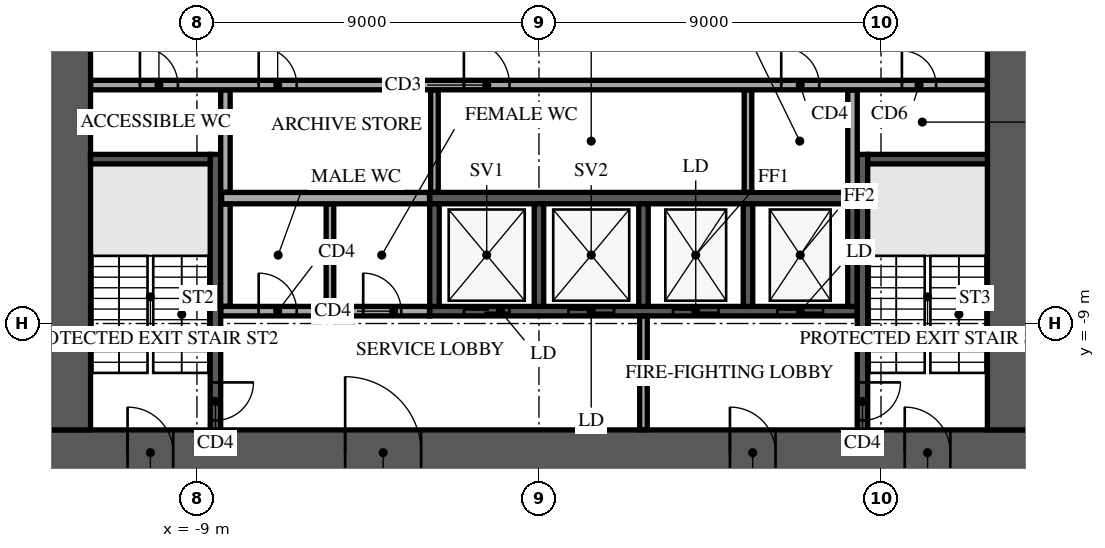
"""IFC4 building model, lengths in metres.
Left out: names, types, materials, properties, quantities, classifications, styles, units other than length and angle.
Written with IfcOpenShell. Run it as: python <this file> out.ifc"""

import sys

from ifc_helpers import new_model, si_unit, direction, frame, frame_2d, origin, place, context, subcontext, project, spatial, rectangle, extrude, element, fill, save


model = new_model("IFC4")
c1 = context("Model", 3, precision=1e-05, world=origin(), true_north=direction((0.0, 1.0)))
c2 = subcontext(c1, "Body", "Model", "MODEL_VIEW")
j1 = project(units=[si_unit("LENGTHUNIT", "METRE"), si_unit("PLANEANGLEUNIT", "RADIAN")], contexts=[c1])
p1 = place(None, origin())
s1 = spatial("IfcSite", under=j1, at=p1, CompositionType="ELEMENT")
p2 = place(p1, origin())
s2 = spatial("IfcBuilding", under=s1, at=p2, CompositionType="ELEMENT")
p3 = place(p2, frame((0.0, 0.0, -9.0)))
s3 = spatial("IfcBuildingStorey", under=s2, at=p3, CompositionType="ELEMENT", Elevation=-9.0)
p4 = place(p3, frame((-13.0, -12.4, 0.0), z_axis=(0.0, 0.0, 1.0), x_axis=(1.0, 0.0, 0.0)))
e1 = element("IfcWall", 1, at=p4, inside=s3, PredefinedType="SHEAR", context=c2, shape_type="SweptSolid", body=[
    extrude(rectangle(XDim=26.0, YDim=1.2, at=frame_2d((13.0, 0.0))), origin(), (0.0, 0.0, 1.0), 4.2),
])
p5 = place(p4, frame((7.9, 0.0, 0.0)))
e2 = element("IfcOpeningElement", 2, at=p5, cuts=e1, PredefinedType="OPENING", context=c2, shape_type="SweptSolid", body=[
    extrude(rectangle(XDim=2.0, YDim=2.1, at=frame_2d((1.0, 1.05))), frame((0.0, 0.61, 0.0), z_axis=(0.0, -1.0, 0.0), x_axis=(1.0, 0.0, 0.0)), (0.0, 0.0, 1.0), 1.22),
])
p6 = place(p4, frame((18.025, 0.0, 0.0)))
e3 = element("IfcOpeningElement", 3, at=p6, cuts=e1, PredefinedType="OPENING", context=c2, shape_type="SweptSolid", body=[
    extrude(rectangle(XDim=1.2, YDim=2.1, at=frame_2d((0.6, 1.05))), frame((0.0, 0.61, 0.0), z_axis=(0.0, -1.0, 0.0), x_axis=(1.0, 0.0, 0.0)), (0.0, 0.0, 1.0), 1.22),
])
p7 = place(p4, frame((2.175, 0.0, 0.0)))
e4 = element("IfcOpeningElement", 4, at=p7, cuts=e1, PredefinedType="OPENING", context=c2, shape_type="SweptSolid", body=[
    extrude(rectangle(XDim=1.2, YDim=2.1, at=frame_2d((0.6, 1.05))), frame((0.0, 0.61, 0.0), z_axis=(0.0, -1.0, 0.0), x_axis=(1.0, 0.0, 0.0)), (0.0, 0.0, 1.0), 1.22),
])
p8 = place(p4, frame((22.625, 0.0, 0.0)))
e5 = element("IfcOpeningElement", 5, at=p8, cuts=e1, PredefinedType="OPENING", context=c2, shape_type="SweptSolid", body=[
    extrude(rectangle(XDim=1.2, YDim=2.1, at=frame_2d((0.6, 1.05))), frame((0.0, 0.61, 0.0), z_axis=(0.0, -1.0, 0.0), x_axis=(1.0, 0.0, 0.0)), (0.0, 0.0, 1.0), 1.22),
])
p9 = place(p3, frame((12.4, -11.8, 0.0), z_axis=(0.0, 0.0, 1.0), x_axis=(0.0, 1.0, 0.0)))
e6 = element("IfcWall", 6, at=p9, inside=s3, PredefinedType="SHEAR", context=c2, shape_type="SweptSolid", body=[
    extrude(rectangle(XDim=23.6, YDim=1.2, at=frame_2d((11.8, 0.0))), origin(), (0.0, 0.0, 1.0), 4.2),
])
p10 = place(p9, frame((10.6, 0.0, 0.0)))
e7 = element("IfcOpeningElement", 7, at=p10, cuts=e6, PredefinedType="OPENING", context=c2, shape_type="SweptSolid", body=[
    extrude(rectangle(XDim=2.4, YDim=2.4, at=frame_2d((1.2, 1.2))), frame((0.0, 0.61, 0.0), z_axis=(0.0, -1.0, 0.0), x_axis=(1.0, 0.0, 0.0)), (0.0, 0.0, 1.0), 1.22),
])
p11 = place(p3, frame((-12.4, -11.8, 0.0), z_axis=(0.0, 0.0, 1.0), x_axis=(0.0, 1.0, 0.0)))
e8 = element("IfcWall", 8, at=p11, inside=s3, PredefinedType="SHEAR", context=c2, shape_type="SweptSolid", body=[
    extrude(rectangle(XDim=23.6, YDim=1.2, at=frame_2d((11.8, 0.0))), origin(), (0.0, 0.0, 1.0), 4.2),
])
p12 = place(p11, frame((10.6, 0.0, 0.0)))
e9 = element("IfcOpeningElement", 9, at=p12, cuts=e8, PredefinedType="OPENING", context=c2, shape_type="SweptSolid", body=[
    extrude(rectangle(XDim=2.4, YDim=2.4, at=frame_2d((1.2, 1.2))), frame((0.0, 0.61, 0.0), z_axis=(0.0, -1.0, 0.0), x_axis=(1.0, 0.0, 0.0)), (0.0, 0.0, 1.0), 1.22),
])
p13 = place(p3, frame((-2.875, -5.7, 0.0), z_axis=(0.0, 0.0, 1.0), x_axis=(1.0, 0.0, 0.0)))
e10 = element("IfcWall", 10, at=p13, inside=s3, PredefinedType="SOLIDWALL", context=c2, shape_type="SweptSolid", body=[
    extrude(rectangle(XDim=11.25, YDim=0.3, at=frame_2d((5.625, 0.0))), origin(), (0.0, 0.0, 1.0), 4.2),
])
p14 = place(p3, frame((-2.875, -8.675, 0.0), z_axis=(0.0, 0.0, 1.0), x_axis=(1.0, 0.0, 0.0)))
e11 = element("IfcWall", 11, at=p14, inside=s3, PredefinedType="SOLIDWALL", context=c2, shape_type="SweptSolid", body=[
    extrude(rectangle(XDim=11.25, YDim=0.25, at=frame_2d((5.625, 0.0))), origin(), (0.0, 0.0, 1.0), 4.2),
])
p15 = place(p14, frame((0.9, 0.0, 0.0)))
e12 = element("IfcOpeningElement", 12, at=p15, cuts=e11, PredefinedType="OPENING", context=c2, shape_type="SweptSolid", body=[
    extrude(rectangle(XDim=1.2, YDim=2.1, at=frame_2d((0.6, 1.05))), frame((0.0, 0.135, 0.0), z_axis=(0.0, -1.0, 0.0), x_axis=(1.0, 0.0, 0.0)), (0.0, 0.0, 1.0), 0.27),
])
p16 = place(p14, frame((3.65, 0.0, 0.0)))
e13 = element("IfcOpeningElement", 13, at=p16, cuts=e11, PredefinedType="OPENING", context=c2, shape_type="SweptSolid", body=[
    extrude(rectangle(XDim=1.2, YDim=2.1, at=frame_2d((0.6, 1.05))), frame((0.0, 0.135, 0.0), z_axis=(0.0, -1.0, 0.0), x_axis=(1.0, 0.0, 0.0)), (0.0, 0.0, 1.0), 0.27),
])
p17 = place(p14, frame((6.4, 0.0, 0.0)))
e14 = element("IfcOpeningElement", 14, at=p17, cuts=e11, PredefinedType="OPENING", context=c2, shape_type="SweptSolid", body=[
    extrude(rectangle(XDim=1.2, YDim=2.1, at=frame_2d((0.6, 1.05))), frame((0.0, 0.135, 0.0), z_axis=(0.0, -1.0, 0.0), x_axis=(1.0, 0.0, 0.0)), (0.0, 0.0, 1.0), 0.27),
])
p18 = place(p14, frame((9.15, 0.0, 0.0)))
e15 = element("IfcOpeningElement", 15, at=p18, cuts=e11, PredefinedType="OPENING", context=c2, shape_type="SweptSolid", body=[
    extrude(rectangle(XDim=1.2, YDim=2.1, at=frame_2d((0.6, 1.05))), frame((0.0, 0.135, 0.0), z_axis=(0.0, -1.0, 0.0), x_axis=(1.0, 0.0, 0.0)), (0.0, 0.0, 1.0), 0.27),
])
for number, where, z_axis, x_axis in (
    (16, (-2.75, -8.55, 0.0), (0.0, 0.0, 1.0), (0.0, 1.0, 0.0)),
    (17, (0.0, -8.55, 0.0), (0.0, 0.0, 1.0), (0.0, 1.0, 0.0)),
    (18, (2.75, -8.55, 0.0), (0.0, 0.0, 1.0), (0.0, 1.0, 0.0)),
    (19, (5.5, -8.55, 0.0), (0.0, 0.0, 1.0), (0.0, 1.0, 0.0)),
    (20, (8.25, -8.55, 0.0), (0.0, 0.0, 1.0), (0.0, 1.0, 0.0)),
):
    element("IfcWall", number, at=place(p3, frame(where, z_axis=z_axis, x_axis=x_axis)), inside=s3, PredefinedType="SOLIDWALL", context=c2, shape_type="SweptSolid", body=[
        extrude(rectangle(XDim=2.7, YDim=0.25, at=frame_2d((1.35, 0.0))), origin(), (0.0, 0.0, 1.0), 4.2),
    ])
p19 = place(p3, frame((-8.512, -4.55, 0.0), z_axis=(0.0, 0.0, 1.0), x_axis=(0.0, -1.0, 0.0)))
e21 = element("IfcWall", 21, at=p19, inside=s3, PredefinedType="SOLIDWALL", context=c2, shape_type="SweptSolid", body=[
    extrude(rectangle(XDim=7.25, YDim=0.275, at=frame_2d((3.625, 0.0))), origin(), (0.0, 0.0, 1.0), 4.2),
])
p20 = place(p19, frame((6.0, 0.0, 0.0)))
e22 = element("IfcOpeningElement", 22, at=p20, cuts=e21, PredefinedType="OPENING", context=c2, shape_type="SweptSolid", body=[
    extrude(rectangle(XDim=1.0, YDim=2.1, at=frame_2d((0.5, 1.05))), frame((0.0, 0.147, 0.0), z_axis=(0.0, -1.0, 0.0), x_axis=(1.0, 0.0, 0.0)), (0.0, 0.0, 1.0), 0.295),
])
p21 = place(p3, frame((-8.65, -4.675, 0.0), z_axis=(0.0, 0.0, 1.0), x_axis=(-1.0, 0.0, 0.0)))
e23 = element("IfcWall", 23, at=p21, inside=s3, PredefinedType="SOLIDWALL", context=c2, shape_type="SweptSolid", body=[
    extrude(rectangle(XDim=3.15, YDim=0.25, at=frame_2d((1.575, 0.0))), origin(), (0.0, 0.0, 1.0), 4.2),
])
p22 = place(p3, frame((8.512, -4.55, 0.0), z_axis=(0.0, 0.0, 1.0), x_axis=(0.0, -1.0, 0.0)))
e24 = element("IfcWall", 24, at=p22, inside=s3, PredefinedType="SOLIDWALL", context=c2, shape_type="SweptSolid", body=[
    extrude(rectangle(XDim=7.25, YDim=0.275, at=frame_2d((3.625, 0.0))), origin(), (0.0, 0.0, 1.0), 4.2),
])
p23 = place(p22, frame((6.0, 0.0, 0.0)))
e25 = element("IfcOpeningElement", 25, at=p23, cuts=e24, PredefinedType="OPENING", context=c2, shape_type="SweptSolid", body=[
    extrude(rectangle(XDim=1.0, YDim=2.1, at=frame_2d((0.5, 1.05))), frame((0.0, 0.147, 0.0), z_axis=(0.0, -1.0, 0.0), x_axis=(1.0, 0.0, 0.0)), (0.0, 0.0, 1.0), 0.295),
])
p24 = place(p3, frame((8.65, -4.675, 0.0), z_axis=(0.0, 0.0, 1.0), x_axis=(1.0, 0.0, 0.0)))
e26 = element("IfcWall", 26, at=p24, inside=s3, PredefinedType="SOLIDWALL", context=c2, shape_type="SweptSolid", body=[
    extrude(rectangle(XDim=3.15, YDim=0.25, at=frame_2d((1.575, 0.0))), origin(), (0.0, 0.0, 1.0), 4.2),
])
p25 = place(p3, frame((2.75, -11.795, 0.0), z_axis=(0.0, 0.0, 1.0), x_axis=(0.0, 1.0, 0.0)))
e27 = element("IfcWall", 27, at=p25, inside=s3, PredefinedType="PARTITIONING", context=c2, shape_type="SweptSolid", body=[
    extrude(rectangle(XDim=2.99, YDim=0.2, at=frame_2d((1.495, 0.0))), origin(), (0.0, 0.0, 1.0), 4.2),
])
p26 = place(p3, frame((-8.37, -8.675, 0.0), z_axis=(0.0, 0.0, 1.0), x_axis=(1.0, 0.0, 0.0)))
e28 = element("IfcWall", 28, at=p26, inside=s3, PredefinedType="PARTITIONING", context=c2, shape_type="SweptSolid", body=[
    extrude(rectangle(XDim=5.49, YDim=0.25, at=frame_2d((2.745, 0.0))), origin(), (0.0, 0.0, 1.0), 4.2),
])
p27 = place(p26, frame((0.995, 0.0, 0.0)))
e29 = element("IfcOpeningElement", 29, at=p27, cuts=e28, PredefinedType="OPENING", context=c2, shape_type="SweptSolid", body=[
    extrude(rectangle(XDim=1.0, YDim=2.1, at=frame_2d((0.5, 1.05))), frame((0.0, 0.135, 0.0), z_axis=(0.0, -1.0, 0.0), x_axis=(1.0, 0.0, 0.0)), (0.0, 0.0, 1.0), 0.27),
])
p28 = place(p26, frame((3.745, 0.0, 0.0)))
e30 = element("IfcOpeningElement", 30, at=p28, cuts=e28, PredefinedType="OPENING", context=c2, shape_type="SweptSolid", body=[
    extrude(rectangle(XDim=1.0, YDim=2.1, at=frame_2d((0.5, 1.05))), frame((0.0, 0.135, 0.0), z_axis=(0.0, -1.0, 0.0), x_axis=(1.0, 0.0, 0.0)), (0.0, 0.0, 1.0), 0.27),
])
p29 = place(p3, frame((-8.25, -8.545, 0.0), z_axis=(0.0, 0.0, 1.0), x_axis=(0.0, 1.0, 0.0)))
e31 = element("IfcWall", 31, at=p29, inside=s3, PredefinedType="PARTITIONING", context=c2, shape_type="SweptSolid", body=[
    extrude(rectangle(XDim=2.69, YDim=0.25, at=frame_2d((1.345, 0.0))), origin(), (0.0, 0.0, 1.0), 4.2),
])
p30 = place(p3, frame((-5.5, -8.545, 0.0), z_axis=(0.0, 0.0, 1.0), x_axis=(0.0, 1.0, 0.0)))
e32 = element("IfcWall", 32, at=p30, inside=s3, PredefinedType="PARTITIONING", context=c2, shape_type="SweptSolid", body=[
    extrude(rectangle(XDim=2.69, YDim=0.2, at=frame_2d((1.345, 0.0))), origin(), (0.0, 0.0, 1.0), 4.2),
])
p31 = place(p3, frame((-8.35, -5.7, 0.0), z_axis=(0.0, 0.0, 1.0), x_axis=(1.0, 0.0, 0.0)))
e33 = element("IfcWall", 33, at=p31, inside=s3, PredefinedType="PARTITIONING", context=c2, shape_type="SweptSolid", body=[
    extrude(rectangle(XDim=5.47, YDim=0.3, at=frame_2d((2.735, 0.0))), origin(), (0.0, 0.0, 1.0), 4.2),
])
p32 = place(p3, frame((-8.25, -5.545, 0.0), z_axis=(0.0, 0.0, 1.0), x_axis=(0.0, 1.0, 0.0)))
e34 = element("IfcWall", 34, at=p32, inside=s3, PredefinedType="PARTITIONING", context=c2, shape_type="SweptSolid", body=[
    extrude(rectangle(XDim=2.69, YDim=0.25, at=frame_2d((1.345, 0.0))), origin(), (0.0, 0.0, 1.0), 4.2),
])
for number, where, z_axis, x_axis in (
    (35, (-2.75, -5.545, 0.0), (0.0, 0.0, 1.0), (0.0, 1.0, 0.0)),
    (36, (5.5, -5.545, 0.0), (0.0, 0.0, 1.0), (0.0, 1.0, 0.0)),
):
    element("IfcWall", number, at=place(p3, frame(where, z_axis=z_axis, x_axis=x_axis)), inside=s3, PredefinedType="PARTITIONING", context=c2, shape_type="SweptSolid", body=[
        extrude(rectangle(XDim=2.69, YDim=0.2, at=frame_2d((1.345, 0.0))), origin(), (0.0, 0.0, 1.0), 4.2),
    ])
p33 = place(p3, frame((8.25, -5.545, 0.0), z_axis=(0.0, 0.0, 1.0), x_axis=(0.0, 1.0, 0.0)))
e37 = element("IfcWall", 37, at=p33, inside=s3, PredefinedType="PARTITIONING", context=c2, shape_type="SweptSolid", body=[
    extrude(rectangle(XDim=2.69, YDim=0.25, at=frame_2d((1.345, 0.0))), origin(), (0.0, 0.0, 1.0), 4.2),
])
p34 = place(p3, frame((-11.795, -2.725, 0.0), z_axis=(0.0, 0.0, 1.0), x_axis=(1.0, 0.0, 0.0)))
e38 = element("IfcWall", 38, at=p34, inside=s3, PredefinedType="PARTITIONING", context=c2, shape_type="SweptSolid", body=[
    extrude(rectangle(XDim=23.59, YDim=0.25, at=frame_2d((11.795, 0.0))), origin(), (0.0, 0.0, 1.0), 4.2),
])
p35 = place(p34, frame((1.295, 0.0, 0.0)))
e39 = element("IfcOpeningElement", 39, at=p35, cuts=e38, PredefinedType="OPENING", context=c2, shape_type="SweptSolid", body=[
    extrude(rectangle(XDim=1.0, YDim=2.1, at=frame_2d((0.5, 1.05))), frame((0.0, 0.135, 0.0), z_axis=(0.0, -1.0, 0.0), x_axis=(1.0, 0.0, 0.0)), (0.0, 0.0, 1.0), 0.27),
])
p36 = place(p34, frame((18.17, 0.0, 0.0)))
e40 = element("IfcOpeningElement", 40, at=p36, cuts=e38, PredefinedType="OPENING", context=c2, shape_type="SweptSolid", body=[
    extrude(rectangle(XDim=1.0, YDim=2.1, at=frame_2d((0.5, 1.05))), frame((0.0, 0.135, 0.0), z_axis=(0.0, -1.0, 0.0), x_axis=(1.0, 0.0, 0.0)), (0.0, 0.0, 1.0), 0.27),
])
p37 = place(p34, frame((21.345, 0.0, 0.0)))
e41 = element("IfcOpeningElement", 41, at=p37, cuts=e38, PredefinedType="OPENING", context=c2, shape_type="SweptSolid", body=[
    extrude(rectangle(XDim=0.9, YDim=2.1, at=frame_2d((0.45, 1.05))), frame((0.0, 0.135, 0.0), z_axis=(0.0, -1.0, 0.0), x_axis=(1.0, 0.0, 0.0)), (0.0, 0.0, 1.0), 0.27),
])
p38 = place(p34, frame((4.42, 0.0, 0.0)))
e42 = element("IfcOpeningElement", 42, at=p38, cuts=e38, PredefinedType="OPENING", context=c2, shape_type="SweptSolid", body=[
    extrude(rectangle(XDim=1.0, YDim=2.1, at=frame_2d((0.5, 1.05))), frame((0.0, 0.135, 0.0), z_axis=(0.0, -1.0, 0.0), x_axis=(1.0, 0.0, 0.0)), (0.0, 0.0, 1.0), 0.27),
])
p39 = place(p34, frame((9.82, 0.0, 0.0)))
e43 = element("IfcOpeningElement", 43, at=p39, cuts=e38, PredefinedType="OPENING", context=c2, shape_type="SweptSolid", body=[
    extrude(rectangle(XDim=1.2, YDim=2.1, at=frame_2d((0.6, 1.05))), frame((0.0, 0.135, 0.0), z_axis=(0.0, -1.0, 0.0), x_axis=(1.0, 0.0, 0.0)), (0.0, 0.0, 1.0), 0.27),
])
p40 = place(p5, origin())
e44 = element("IfcDoor", 44, at=p40, inside=s3, OperationType="SINGLE_SWING_LEFT", PredefinedType="DOOR", context=c2, shape_type="SweptSolid", body=[
    extrude(rectangle(XDim=2.0, YDim=2.1, at=frame_2d((1.0, 1.05))), frame((0.0, 0.025, 0.0), z_axis=(0.0, -1.0, 0.0), x_axis=(1.0, 0.0, 0.0)), (0.0, 0.0, 1.0), 0.05),
])
fill(e2, e44)
p41 = place(p6, origin())
e45 = element("IfcDoor", 45, at=p41, inside=s3, OperationType="SINGLE_SWING_LEFT", PredefinedType="DOOR", context=c2, shape_type="SweptSolid", body=[
    extrude(rectangle(XDim=1.2, YDim=2.1, at=frame_2d((0.6, 1.05))), frame((0.0, 0.025, 0.0), z_axis=(0.0, -1.0, 0.0), x_axis=(1.0, 0.0, 0.0)), (0.0, 0.0, 1.0), 0.05),
])
fill(e3, e45)
p42 = place(p7, origin())
e46 = element("IfcDoor", 46, at=p42, inside=s3, OperationType="SINGLE_SWING_LEFT", PredefinedType="DOOR", context=c2, shape_type="SweptSolid", body=[
    extrude(rectangle(XDim=1.2, YDim=2.1, at=frame_2d((0.6, 1.05))), frame((0.0, 0.025, 0.0), z_axis=(0.0, -1.0, 0.0), x_axis=(1.0, 0.0, 0.0)), (0.0, 0.0, 1.0), 0.05),
])
fill(e4, e46)
p43 = place(p8, origin())
e47 = element("IfcDoor", 47, at=p43, inside=s3, OperationType="SINGLE_SWING_LEFT", PredefinedType="DOOR", context=c2, shape_type="SweptSolid", body=[
    extrude(rectangle(XDim=1.2, YDim=2.1, at=frame_2d((0.6, 1.05))), frame((0.0, 0.025, 0.0), z_axis=(0.0, -1.0, 0.0), x_axis=(1.0, 0.0, 0.0)), (0.0, 0.0, 1.0), 0.05),
])
fill(e5, e47)
p44 = place(p15, origin())
e48 = element("IfcDoor", 48, at=p44, inside=s3, OperationType="DOUBLE_DOOR_SLIDING", PredefinedType="DOOR", context=c2, shape_type="SweptSolid", body=[
    extrude(rectangle(XDim=1.2, YDim=2.1, at=frame_2d((0.6, 1.05))), frame((0.0, 0.025, 0.0), z_axis=(0.0, -1.0, 0.0), x_axis=(1.0, 0.0, 0.0)), (0.0, 0.0, 1.0), 0.05),
])
fill(e12, e48)
p45 = place(p16, origin())
e49 = element("IfcDoor", 49, at=p45, inside=s3, OperationType="DOUBLE_DOOR_SLIDING", PredefinedType="DOOR", context=c2, shape_type="SweptSolid", body=[
    extrude(rectangle(XDim=1.2, YDim=2.1, at=frame_2d((0.6, 1.05))), frame((0.0, 0.025, 0.0), z_axis=(0.0, -1.0, 0.0), x_axis=(1.0, 0.0, 0.0)), (0.0, 0.0, 1.0), 0.05),
])
fill(e13, e49)
p46 = place(p17, origin())
e50 = element("IfcDoor", 50, at=p46, inside=s3, OperationType="DOUBLE_DOOR_SLIDING", PredefinedType="DOOR", context=c2, shape_type="SweptSolid", body=[
    extrude(rectangle(XDim=1.2, YDim=2.1, at=frame_2d((0.6, 1.05))), frame((0.0, 0.025, 0.0), z_axis=(0.0, -1.0, 0.0), x_axis=(1.0, 0.0, 0.0)), (0.0, 0.0, 1.0), 0.05),
])
fill(e14, e50)
p47 = place(p18, origin())
e51 = element("IfcDoor", 51, at=p47, inside=s3, OperationType="DOUBLE_DOOR_SLIDING", PredefinedType="DOOR", context=c2, shape_type="SweptSolid", body=[
    extrude(rectangle(XDim=1.2, YDim=2.1, at=frame_2d((0.6, 1.05))), frame((0.0, 0.025, 0.0), z_axis=(0.0, -1.0, 0.0), x_axis=(1.0, 0.0, 0.0)), (0.0, 0.0, 1.0), 0.05),
])
fill(e15, e51)
p48 = place(p20, origin())
e52 = element("IfcDoor", 52, at=p48, inside=s3, OperationType="SINGLE_SWING_LEFT", PredefinedType="DOOR", context=c2, shape_type="SweptSolid", body=[
    extrude(rectangle(XDim=1.0, YDim=2.1, at=frame_2d((0.5, 1.05))), frame((0.0, 0.025, 0.0), z_axis=(0.0, -1.0, 0.0), x_axis=(1.0, 0.0, 0.0)), (0.0, 0.0, 1.0), 0.05),
])
fill(e22, e52)
p49 = place(p23, origin())
e53 = element("IfcDoor", 53, at=p49, inside=s3, OperationType="SINGLE_SWING_LEFT", PredefinedType="DOOR", context=c2, shape_type="SweptSolid", body=[
    extrude(rectangle(XDim=1.0, YDim=2.1, at=frame_2d((0.5, 1.05))), frame((0.0, 0.025, 0.0), z_axis=(0.0, -1.0, 0.0), x_axis=(1.0, 0.0, 0.0)), (0.0, 0.0, 1.0), 0.05),
])
fill(e25, e53)
p50 = place(p27, origin())
e54 = element("IfcDoor", 54, at=p50, inside=s3, OperationType="SINGLE_SWING_LEFT", PredefinedType="DOOR", context=c2, shape_type="SweptSolid", body=[
    extrude(rectangle(XDim=1.0, YDim=2.1, at=frame_2d((0.5, 1.05))), frame((0.0, 0.025, 0.0), z_axis=(0.0, -1.0, 0.0), x_axis=(1.0, 0.0, 0.0)), (0.0, 0.0, 1.0), 0.05),
])
fill(e29, e54)
p51 = place(p28, origin())
e55 = element("IfcDoor", 55, at=p51, inside=s3, OperationType="SINGLE_SWING_LEFT", PredefinedType="DOOR", context=c2, shape_type="SweptSolid", body=[
    extrude(rectangle(XDim=1.0, YDim=2.1, at=frame_2d((0.5, 1.05))), frame((0.0, 0.025, 0.0), z_axis=(0.0, -1.0, 0.0), x_axis=(1.0, 0.0, 0.0)), (0.0, 0.0, 1.0), 0.05),
])
fill(e30, e55)
p52 = place(p35, origin())
e56 = element("IfcDoor", 56, at=p52, inside=s3, OperationType="SINGLE_SWING_LEFT", PredefinedType="DOOR", context=c2, shape_type="SweptSolid", body=[
    extrude(rectangle(XDim=1.0, YDim=2.1, at=frame_2d((0.5, 1.05))), frame((0.0, 0.025, 0.0), z_axis=(0.0, -1.0, 0.0), x_axis=(1.0, 0.0, 0.0)), (0.0, 0.0, 1.0), 0.05),
])
fill(e39, e56)
p53 = place(p36, origin())
e57 = element("IfcDoor", 57, at=p53, inside=s3, OperationType="SINGLE_SWING_LEFT", PredefinedType="DOOR", context=c2, shape_type="SweptSolid", body=[
    extrude(rectangle(XDim=1.0, YDim=2.1, at=frame_2d((0.5, 1.05))), frame((0.0, 0.025, 0.0), z_axis=(0.0, -1.0, 0.0), x_axis=(1.0, 0.0, 0.0)), (0.0, 0.0, 1.0), 0.05),
])
fill(e40, e57)
p54 = place(p37, origin())
e58 = element("IfcDoor", 58, at=p54, inside=s3, OperationType="SINGLE_SWING_LEFT", PredefinedType="DOOR", context=c2, shape_type="SweptSolid", body=[
    extrude(rectangle(XDim=0.9, YDim=2.1, at=frame_2d((0.45, 1.05))), frame((0.0, 0.025, 0.0), z_axis=(0.0, -1.0, 0.0), x_axis=(1.0, 0.0, 0.0)), (0.0, 0.0, 1.0), 0.05),
])
fill(e41, e58)
p55 = place(p38, origin())
e59 = element("IfcDoor", 59, at=p55, inside=s3, OperationType="SINGLE_SWING_LEFT", PredefinedType="DOOR", context=c2, shape_type="SweptSolid", body=[
    extrude(rectangle(XDim=1.0, YDim=2.1, at=frame_2d((0.5, 1.05))), frame((0.0, 0.025, 0.0), z_axis=(0.0, -1.0, 0.0), x_axis=(1.0, 0.0, 0.0)), (0.0, 0.0, 1.0), 0.05),
])
fill(e42, e59)
p56 = place(p39, origin())
e60 = element("IfcDoor", 60, at=p56, inside=s3, OperationType="SINGLE_SWING_LEFT", PredefinedType="DOOR", context=c2, shape_type="SweptSolid", body=[
    extrude(rectangle(XDim=1.2, YDim=2.1, at=frame_2d((0.6, 1.05))), frame((0.0, 0.025, 0.0), z_axis=(0.0, -1.0, 0.0), x_axis=(1.0, 0.0, 0.0)), (0.0, 0.0, 1.0), 0.05),
])
fill(e43, e60)
save(model, sys.argv[1])
